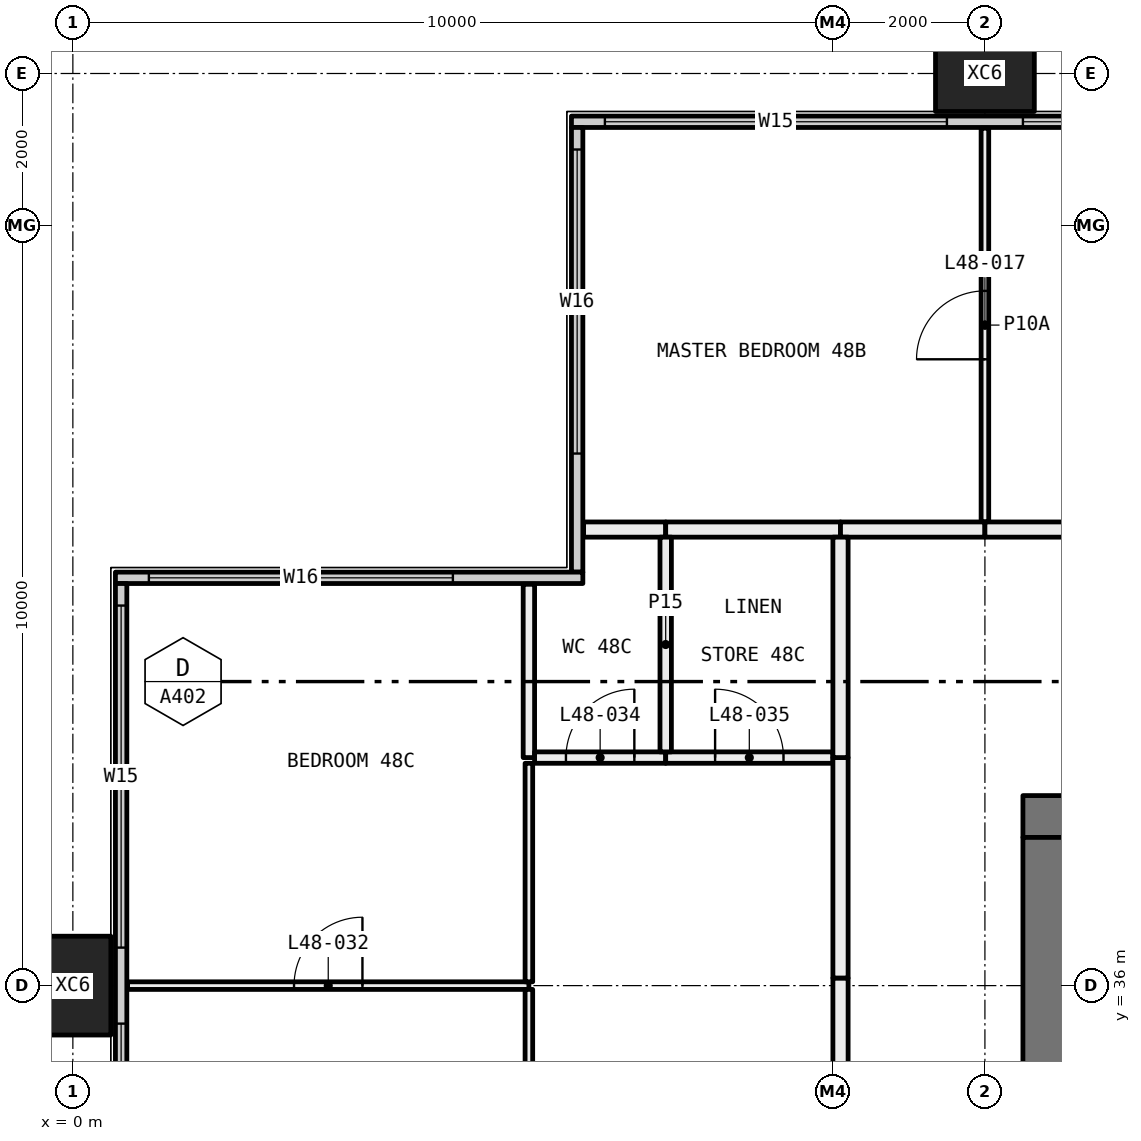
"""IFC4 building model, lengths in metres.
Left out: names, types, materials, properties, quantities, classifications, styles, units other than length and angle.
Written with IfcOpenShell. Run it as: python <this file> out.ifc"""

import sys

from ifc_helpers import new_model, si_unit, direction, frame, frame_2d, origin, origin_2d, place, context, subcontext, project, spatial, rectangle, hollow_rectangle, extrude, element, fill, save


model = new_model("IFC4")
c1 = context("Model", 3, precision=1e-05, world=origin(), true_north=direction((0.0, 1.0)))
c2 = subcontext(c1, "Body", "Model", "MODEL_VIEW")
j1 = project(units=[si_unit("LENGTHUNIT", "METRE"), si_unit("PLANEANGLEUNIT", "RADIAN")], contexts=[c1])
p1 = place(None, origin())
s1 = spatial("IfcSite", under=j1, at=p1, CompositionType="ELEMENT")
p2 = place(p1, origin())
s2 = spatial("IfcBuilding", under=s1, at=p2, CompositionType="ELEMENT")
p3 = place(p2, frame((0.0, 0.0, 182.4)))
s3 = spatial("IfcBuildingStorey", under=s2, at=p3, CompositionType="ELEMENT", Elevation=182.4)
for number, where, z_axis, x_axis in (
    (1, (0.0, 36.0, -0.4), (0.0, 0.0, 1.0), (0.0, 1.0, 0.0)),
    (2, (12.0, 48.0, -0.4), (0.0, 0.0, 1.0), (1.0, 0.0, 0.0)),
):
    element("IfcColumn", number, at=place(p3, frame(where, z_axis=z_axis, x_axis=x_axis)), inside=s3, PredefinedType="COLUMN", context=c2, shape_type="SweptSolid", body=[
        extrude(hollow_rectangle(XDim=1.3, YDim=1.0, WallThickness=0.05, at=origin_2d()), origin(), (0.0, 0.0, 1.0), 3.45),
    ])
p4 = place(p3, frame((6.56, 47.365, 0.0), z_axis=(0.0, 0.0, 1.0), x_axis=(1.0, 0.0, 0.0)))
e3 = element("IfcWall", 3, at=p4, inside=s3, PredefinedType="ELEMENTEDWALL", context=c2, shape_type="SweptSolid", body=[
    extrude(rectangle(XDim=46.88, YDim=0.15, at=frame_2d((23.44, 0.0))), origin(), (0.0, 0.0, 1.0), 3.05),
])
p5 = place(p4, frame((0.44, 0.0, 0.45)))
e4 = element("IfcOpeningElement", 4, at=p5, cuts=e3, PredefinedType="OPENING", context=c2, shape_type="SweptSolid", body=[
    extrude(rectangle(XDim=4.5, YDim=2.55, at=frame_2d((2.25, 1.275))), frame((0.0, 0.085, 0.0), z_axis=(0.0, -1.0, 0.0), x_axis=(1.0, 0.0, 0.0)), (0.0, 0.0, 1.0), 0.17),
])
p6 = place(p4, frame((5.94, 0.0, 0.45)))
e5 = element("IfcOpeningElement", 5, at=p6, cuts=e3, PredefinedType="OPENING", context=c2, shape_type="SweptSolid", body=[
    extrude(rectangle(XDim=3.75, YDim=2.55, at=frame_2d((1.875, 1.275))), frame((0.0, 0.085, 0.0), z_axis=(0.0, -1.0, 0.0), x_axis=(1.0, 0.0, 0.0)), (0.0, 0.0, 1.0), 0.17),
])
p7 = place(p4, frame((13.19, 0.0, 0.45)))
e6 = element("IfcOpeningElement", 6, at=p7, cuts=e3, PredefinedType="OPENING", context=c2, shape_type="SweptSolid", body=[
    extrude(rectangle(XDim=3.75, YDim=2.55, at=frame_2d((1.875, 1.275))), frame((0.0, 0.085, 0.0), z_axis=(0.0, -1.0, 0.0), x_axis=(1.0, 0.0, 0.0)), (0.0, 0.0, 1.0), 0.17),
])
p8 = place(p4, frame((17.94, 0.0, 0.45)))
e7 = element("IfcOpeningElement", 7, at=p8, cuts=e3, PredefinedType="OPENING", context=c2, shape_type="SweptSolid", body=[
    extrude(rectangle(XDim=3.75, YDim=2.55, at=frame_2d((1.875, 1.275))), frame((0.0, 0.085, 0.0), z_axis=(0.0, -1.0, 0.0), x_axis=(1.0, 0.0, 0.0)), (0.0, 0.0, 1.0), 0.17),
])
p9 = place(p4, frame((25.19, 0.0, 0.45)))
e8 = element("IfcOpeningElement", 8, at=p9, cuts=e3, PredefinedType="OPENING", context=c2, shape_type="SweptSolid", body=[
    extrude(rectangle(XDim=0.75, YDim=2.55, at=frame_2d((0.375, 1.275))), frame((0.0, 0.085, 0.0), z_axis=(0.0, -1.0, 0.0), x_axis=(1.0, 0.0, 0.0)), (0.0, 0.0, 1.0), 0.17),
])
p10 = place(p4, frame((26.94, 0.0, 0.45)))
e9 = element("IfcOpeningElement", 9, at=p10, cuts=e3, PredefinedType="OPENING", context=c2, shape_type="SweptSolid", body=[
    extrude(rectangle(XDim=2.0, YDim=2.55, at=frame_2d((1.0, 1.275))), frame((0.0, 0.085, 0.0), z_axis=(0.0, -1.0, 0.0), x_axis=(1.0, 0.0, 0.0)), (0.0, 0.0, 1.0), 0.17),
])
p11 = place(p4, frame((29.94, 0.0, 0.45)))
e10 = element("IfcOpeningElement", 10, at=p11, cuts=e3, PredefinedType="OPENING", context=c2, shape_type="SweptSolid", body=[
    extrude(rectangle(XDim=3.75, YDim=2.55, at=frame_2d((1.875, 1.275))), frame((0.0, 0.085, 0.0), z_axis=(0.0, -1.0, 0.0), x_axis=(1.0, 0.0, 0.0)), (0.0, 0.0, 1.0), 0.17),
])
p12 = place(p4, frame((37.19, 0.0, 0.45)))
e11 = element("IfcOpeningElement", 11, at=p12, cuts=e3, PredefinedType="OPENING", context=c2, shape_type="SweptSolid", body=[
    extrude(rectangle(XDim=3.75, YDim=2.55, at=frame_2d((1.875, 1.275))), frame((0.0, 0.085, 0.0), z_axis=(0.0, -1.0, 0.0), x_axis=(1.0, 0.0, 0.0)), (0.0, 0.0, 1.0), 0.17),
])
p13 = place(p4, frame((41.94, 0.0, 0.45)))
e12 = element("IfcOpeningElement", 12, at=p13, cuts=e3, PredefinedType="OPENING", context=c2, shape_type="SweptSolid", body=[
    extrude(rectangle(XDim=4.5, YDim=2.55, at=frame_2d((2.25, 1.275))), frame((0.0, 0.085, 0.0), z_axis=(0.0, -1.0, 0.0), x_axis=(1.0, 0.0, 0.0)), (0.0, 0.0, 1.0), 0.17),
])
p14 = place(p3, frame((6.635, 41.44, 0.0), z_axis=(0.0, 0.0, 1.0), x_axis=(0.0, 1.0, 0.0)))
e13 = element("IfcWall", 13, at=p14, inside=s3, PredefinedType="ELEMENTEDWALL", context=c2, shape_type="SweptSolid", body=[
    extrude(rectangle(XDim=5.85, YDim=0.15, at=frame_2d((2.925, 0.0))), origin(), (0.0, 0.0, 1.0), 3.05),
])
p15 = place(p14, frame((1.56, 0.0, 0.45)))
e14 = element("IfcOpeningElement", 14, at=p15, cuts=e13, PredefinedType="OPENING", context=c2, shape_type="SweptSolid", body=[
    extrude(rectangle(XDim=4.0, YDim=2.55, at=frame_2d((2.0, 1.275))), frame((0.0, 0.085, 0.0), z_axis=(0.0, -1.0, 0.0), x_axis=(1.0, 0.0, 0.0)), (0.0, 0.0, 1.0), 0.17),
])
p16 = place(p3, frame((0.56, 41.365, 0.0), z_axis=(0.0, 0.0, 1.0), x_axis=(1.0, 0.0, 0.0)))
e15 = element("IfcWall", 15, at=p16, inside=s3, PredefinedType="ELEMENTEDWALL", context=c2, shape_type="SweptSolid", body=[
    extrude(rectangle(XDim=6.15, YDim=0.15, at=frame_2d((3.075, 0.0))), origin(), (0.0, 0.0, 1.0), 3.05),
])
p17 = place(p16, frame((0.44, 0.0, 0.45)))
e16 = element("IfcOpeningElement", 16, at=p17, cuts=e15, PredefinedType="OPENING", context=c2, shape_type="SweptSolid", body=[
    extrude(rectangle(XDim=4.0, YDim=2.55, at=frame_2d((2.0, 1.275))), frame((0.0, 0.085, 0.0), z_axis=(0.0, -1.0, 0.0), x_axis=(1.0, 0.0, 0.0)), (0.0, 0.0, 1.0), 0.17),
])
p18 = place(p3, frame((0.635, 18.71, 0.0), z_axis=(0.0, 0.0, 1.0), x_axis=(0.0, 1.0, 0.0)))
e17 = element("IfcWall", 17, at=p18, inside=s3, PredefinedType="ELEMENTEDWALL", context=c2, shape_type="SweptSolid", body=[
    extrude(rectangle(XDim=22.58, YDim=0.15, at=frame_2d((11.29, 0.0))), origin(), (0.0, 0.0, 1.0), 3.05),
])
p19 = place(p18, frame((0.29, 0.0, 0.45)))
e18 = element("IfcOpeningElement", 18, at=p19, cuts=e17, PredefinedType="OPENING", context=c2, shape_type="SweptSolid", body=[
    extrude(rectangle(XDim=4.5, YDim=2.55, at=frame_2d((2.25, 1.275))), frame((0.0, 0.085, 0.0), z_axis=(0.0, -1.0, 0.0), x_axis=(1.0, 0.0, 0.0)), (0.0, 0.0, 1.0), 0.17),
])
p20 = place(p18, frame((5.79, 0.0, 0.45)))
e19 = element("IfcOpeningElement", 19, at=p20, cuts=e17, PredefinedType="OPENING", context=c2, shape_type="SweptSolid", body=[
    extrude(rectangle(XDim=3.75, YDim=2.55, at=frame_2d((1.875, 1.275))), frame((0.0, 0.085, 0.0), z_axis=(0.0, -1.0, 0.0), x_axis=(1.0, 0.0, 0.0)), (0.0, 0.0, 1.0), 0.17),
])
p21 = place(p18, frame((13.04, 0.0, 0.45)))
e20 = element("IfcOpeningElement", 20, at=p21, cuts=e17, PredefinedType="OPENING", context=c2, shape_type="SweptSolid", body=[
    extrude(rectangle(XDim=0.75, YDim=2.55, at=frame_2d((0.375, 1.275))), frame((0.0, 0.085, 0.0), z_axis=(0.0, -1.0, 0.0), x_axis=(1.0, 0.0, 0.0)), (0.0, 0.0, 1.0), 0.17),
])
p22 = place(p18, frame((14.79, 0.0, 0.45)))
e21 = element("IfcOpeningElement", 21, at=p22, cuts=e17, PredefinedType="OPENING", context=c2, shape_type="SweptSolid", body=[
    extrude(rectangle(XDim=2.0, YDim=2.55, at=frame_2d((1.0, 1.275))), frame((0.0, 0.085, 0.0), z_axis=(0.0, -1.0, 0.0), x_axis=(1.0, 0.0, 0.0)), (0.0, 0.0, 1.0), 0.17),
])
p23 = place(p18, frame((17.79, 0.0, 0.45)))
e22 = element("IfcOpeningElement", 22, at=p23, cuts=e17, PredefinedType="OPENING", context=c2, shape_type="SweptSolid", body=[
    extrude(rectangle(XDim=4.5, YDim=2.55, at=frame_2d((2.25, 1.275))), frame((0.0, 0.085, 0.0), z_axis=(0.0, -1.0, 0.0), x_axis=(1.0, 0.0, 0.0)), (0.0, 0.0, 1.0), 0.17),
])
p24 = place(p3, frame((12.0, 42.1, 0.0), z_axis=(0.0, 0.0, 1.0), x_axis=(0.0, 1.0, 0.0)))
e23 = element("IfcWall", 23, at=p24, inside=s3, PredefinedType="PARTITIONING", context=c2, shape_type="SweptSolid", body=[
    extrude(rectangle(XDim=5.18, YDim=0.1, at=frame_2d((2.59, 0.0))), origin(), (0.0, 0.0, 1.0), 3.05),
])
p25 = place(p24, frame((2.14, 0.0, 0.0)))
e24 = element("IfcOpeningElement", 24, at=p25, cuts=e23, PredefinedType="OPENING", context=c2, shape_type="SweptSolid", body=[
    extrude(rectangle(XDim=0.9, YDim=2.1, at=frame_2d((0.45, 1.05))), frame((0.0, 0.06, 0.0), z_axis=(0.0, -1.0, 0.0), x_axis=(1.0, 0.0, 0.0)), (0.0, 0.0, 1.0), 0.12),
])
p26 = place(p3, frame((6.72, 42.0, 0.0), z_axis=(0.0, 0.0, 1.0), x_axis=(1.0, 0.0, 0.0)))
e25 = element("IfcWall", 25, at=p26, inside=s3, PredefinedType="PARTITIONING", context=c2, shape_type="SweptSolid", body=[
    extrude(rectangle(XDim=1.08, YDim=0.2, at=frame_2d((0.54, 0.0))), origin(), (0.0, 0.0, 1.0), 3.05),
])
p27 = place(p3, frame((7.8, 42.0, 0.0), z_axis=(0.0, 0.0, 1.0), x_axis=(1.0, 0.0, 0.0)))
e26 = element("IfcWall", 26, at=p27, inside=s3, PredefinedType="PARTITIONING", context=c2, shape_type="SweptSolid", body=[
    extrude(rectangle(XDim=2.3, YDim=0.2, at=frame_2d((1.15, 0.0))), origin(), (0.0, 0.0, 1.0), 3.05),
])
p28 = place(p3, frame((10.1, 42.0, 0.0), z_axis=(0.0, 0.0, 1.0), x_axis=(1.0, 0.0, 0.0)))
e27 = element("IfcWall", 27, at=p28, inside=s3, PredefinedType="PARTITIONING", context=c2, shape_type="SweptSolid", body=[
    extrude(rectangle(XDim=1.9, YDim=0.2, at=frame_2d((0.95, 0.0))), origin(), (0.0, 0.0, 1.0), 3.05),
])
p29 = place(p3, frame((12.0, 42.0, 0.0), z_axis=(0.0, 0.0, 1.0), x_axis=(1.0, 0.0, 0.0)))
e28 = element("IfcWall", 28, at=p29, inside=s3, PredefinedType="PARTITIONING", context=c2, shape_type="SweptSolid", body=[
    extrude(rectangle(XDim=6.0, YDim=0.2, at=frame_2d((3.0, 0.0))), origin(), (0.0, 0.0, 1.0), 3.05),
])
p30 = place(p29, frame((2.5, 0.0, 0.0)))
e29 = element("IfcOpeningElement", 29, at=p30, cuts=e28, PredefinedType="OPENING", context=c2, shape_type="SweptSolid", body=[
    extrude(rectangle(XDim=1.0, YDim=2.1, at=frame_2d((0.5, 1.05))), frame((0.0, 0.11, 0.0), z_axis=(0.0, -1.0, 0.0), x_axis=(1.0, 0.0, 0.0)), (0.0, 0.0, 1.0), 0.22),
])
p31 = place(p3, frame((6.0, 36.0, 0.0), z_axis=(0.0, 0.0, 1.0), x_axis=(-1.0, 0.0, 0.0)))
e30 = element("IfcWall", 30, at=p31, inside=s3, PredefinedType="PARTITIONING", context=c2, shape_type="SweptSolid", body=[
    extrude(rectangle(XDim=5.28, YDim=0.1, at=frame_2d((2.64, 0.0))), origin(), (0.0, 0.0, 1.0), 2.45),
])
p32 = place(p31, frame((2.19, 0.0, 0.0)))
e31 = element("IfcOpeningElement", 31, at=p32, cuts=e30, PredefinedType="OPENING", context=c2, shape_type="SweptSolid", body=[
    extrude(rectangle(XDim=0.9, YDim=2.1, at=frame_2d((0.45, 1.05))), frame((0.0, 0.06, 0.0), z_axis=(0.0, -1.0, 0.0), x_axis=(1.0, 0.0, 0.0)), (0.0, 0.0, 1.0), 0.12),
])
p33 = place(p3, frame((6.0, 25.5, 0.0), z_axis=(0.0, 0.0, 1.0), x_axis=(0.0, 1.0, 0.0)))
e32 = element("IfcWall", 32, at=p33, inside=s3, PredefinedType="PARTITIONING", context=c2, shape_type="SweptSolid", body=[
    extrude(rectangle(XDim=10.45, YDim=0.1, at=frame_2d((5.225, 0.0))), origin(), (0.0, 0.0, 1.0), 2.45),
])
p34 = place(p3, frame((6.0, 36.05, 0.0), z_axis=(0.0, 0.0, 1.0), x_axis=(0.0, 1.0, 0.0)))
e33 = element("IfcWall", 33, at=p34, inside=s3, PredefinedType="PARTITIONING", context=c2, shape_type="SweptSolid", body=[
    extrude(rectangle(XDim=2.875, YDim=0.1, at=frame_2d((1.438, 0.0))), origin(), (0.0, 0.0, 1.0), 2.45),
])
p35 = place(p3, frame((6.0, 39.0, 0.0), z_axis=(0.0, 0.0, 1.0), x_axis=(0.0, 1.0, 0.0)))
e34 = element("IfcWall", 34, at=p35, inside=s3, PredefinedType="PARTITIONING", context=c2, shape_type="SweptSolid", body=[
    extrude(rectangle(XDim=2.28, YDim=0.15, at=frame_2d((1.14, 0.0))), origin(), (0.0, 0.0, 1.0), 3.05),
])
p36 = place(p3, frame((7.8, 39.0, 0.0), z_axis=(0.0, 0.0, 1.0), x_axis=(-1.0, 0.0, 0.0)))
e35 = element("IfcWall", 35, at=p36, inside=s3, PredefinedType="PARTITIONING", context=c2, shape_type="SweptSolid", body=[
    extrude(rectangle(XDim=1.725, YDim=0.15, at=frame_2d((0.863, 0.0))), origin(), (0.0, 0.0, 1.0), 3.05),
])
p37 = place(p36, frame((0.413, 0.0, 0.0)))
e36 = element("IfcOpeningElement", 36, at=p37, cuts=e35, PredefinedType="OPENING", context=c2, shape_type="SweptSolid", body=[
    extrude(rectangle(XDim=0.9, YDim=2.1, at=frame_2d((0.45, 1.05))), frame((0.0, 0.085, 0.0), z_axis=(0.0, -1.0, 0.0), x_axis=(1.0, 0.0, 0.0)), (0.0, 0.0, 1.0), 0.17),
])
p38 = place(p3, frame((10.0, 39.0, 0.0), z_axis=(0.0, 0.0, 1.0), x_axis=(-1.0, 0.0, 0.0)))
e37 = element("IfcWall", 37, at=p38, inside=s3, PredefinedType="PARTITIONING", context=c2, shape_type="SweptSolid", body=[
    extrude(rectangle(XDim=2.2, YDim=0.15, at=frame_2d((1.1, 0.0))), origin(), (0.0, 0.0, 1.0), 3.05),
])
p39 = place(p38, frame((0.65, 0.0, 0.0)))
e38 = element("IfcOpeningElement", 38, at=p39, cuts=e37, PredefinedType="OPENING", context=c2, shape_type="SweptSolid", body=[
    extrude(rectangle(XDim=0.9, YDim=2.1, at=frame_2d((0.45, 1.05))), frame((0.0, 0.085, 0.0), z_axis=(0.0, -1.0, 0.0), x_axis=(1.0, 0.0, 0.0)), (0.0, 0.0, 1.0), 0.17),
])
p40 = place(p3, frame((10.1, 25.5, 0.0), z_axis=(0.0, 0.0, 1.0), x_axis=(0.0, 1.0, 0.0)))
e39 = element("IfcWall", 39, at=p40, inside=s3, PredefinedType="PARTITIONING", context=c2, shape_type="SweptSolid", body=[
    extrude(rectangle(XDim=10.6, YDim=0.2, at=frame_2d((5.3, 0.0))), origin(), (0.0, 0.0, 1.0), 2.45),
])
p41 = place(p3, frame((10.1, 36.1, 0.0), z_axis=(0.0, 0.0, 1.0), x_axis=(0.0, 1.0, 0.0)))
e40 = element("IfcWall", 40, at=p41, inside=s3, PredefinedType="PARTITIONING", context=c2, shape_type="SweptSolid", body=[
    extrude(rectangle(XDim=2.9, YDim=0.2, at=frame_2d((1.45, 0.0))), origin(), (0.0, 0.0, 1.0), 3.05),
])
p42 = place(p3, frame((7.8, 39.075, 0.0), z_axis=(0.0, 0.0, 1.0), x_axis=(0.0, 1.0, 0.0)))
e41 = element("IfcWall", 41, at=p42, inside=s3, PredefinedType="PARTITIONING", context=c2, shape_type="SweptSolid", body=[
    extrude(rectangle(XDim=2.825, YDim=0.15, at=frame_2d((1.413, 0.0))), origin(), (0.0, 0.0, 1.0), 3.05),
])
p43 = place(p3, frame((10.1, 39.0, 0.0), z_axis=(0.0, 0.0, 1.0), x_axis=(0.0, 1.0, 0.0)))
e42 = element("IfcWall", 42, at=p43, inside=s3, PredefinedType="PARTITIONING", context=c2, shape_type="SweptSolid", body=[
    extrude(rectangle(XDim=2.9, YDim=0.2, at=frame_2d((1.45, 0.0))), origin(), (0.0, 0.0, 1.0), 3.05),
])
p44 = place(p3, frame((12.5, 38.225, 0.0), z_axis=(0.0, 0.0, 1.0), x_axis=(1.0, 0.0, 0.0)))
e43 = element("IfcWall", 43, at=p44, inside=s3, PredefinedType="SHEAR", context=c2, shape_type="SweptSolid", body=[
    extrude(rectangle(XDim=11.0, YDim=0.55, at=frame_2d((5.5, 0.0))), origin(), (0.0, 0.0, 1.0), 3.05),
])
p45 = place(p44, frame((8.525, 0.0, 0.0)))
e44 = element("IfcOpeningElement", 44, at=p45, cuts=e43, PredefinedType="OPENING", context=c2, shape_type="SweptSolid", body=[
    extrude(rectangle(XDim=1.6, YDim=2.1, at=frame_2d((0.8, 1.05))), frame((0.0, 0.285, 0.0), z_axis=(0.0, -1.0, 0.0), x_axis=(1.0, 0.0, 0.0)), (0.0, 0.0, 1.0), 0.57),
])
p46 = place(p3, frame((12.775, 22.05, 0.0), z_axis=(0.0, 0.0, 1.0), x_axis=(0.0, 1.0, 0.0)))
e45 = element("IfcWall", 45, at=p46, inside=s3, PredefinedType="SHEAR", context=c2, shape_type="SweptSolid", body=[
    extrude(rectangle(XDim=15.9, YDim=0.55, at=frame_2d((7.95, 0.0))), origin(), (0.0, 0.0, 1.0), 3.05),
])
p47 = place(p46, frame((8.4, 0.0, 0.0)))
e46 = element("IfcOpeningElement", 46, at=p47, cuts=e45, PredefinedType="OPENING", context=c2, shape_type="SweptSolid", body=[
    extrude(rectangle(XDim=1.6, YDim=2.1, at=frame_2d((0.8, 1.05))), frame((0.0, 0.285, 0.0), z_axis=(0.0, -1.0, 0.0), x_axis=(1.0, 0.0, 0.0)), (0.0, 0.0, 1.0), 0.57),
])
p48 = place(p46, frame((2.175, 0.0, 0.0)))
e47 = element("IfcOpeningElement", 47, at=p48, cuts=e45, PredefinedType="OPENING", context=c2, shape_type="SweptSolid", body=[
    extrude(rectangle(XDim=1.0, YDim=2.1, at=frame_2d((0.5, 1.05))), frame((0.0, 0.285, 0.0), z_axis=(0.0, -1.0, 0.0), x_axis=(1.0, 0.0, 0.0)), (0.0, 0.0, 1.0), 0.57),
])
p49 = place(p5, origin())
e48 = element("IfcWindow", 48, at=p49, inside=s3, PartitioningType="SINGLE_PANEL", PredefinedType="WINDOW", context=c2, shape_type="SweptSolid", body=[
    extrude(rectangle(XDim=4.5, YDim=2.55, at=frame_2d((2.25, 1.275))), frame((0.0, 0.03, 0.0), z_axis=(0.0, -1.0, 0.0), x_axis=(1.0, 0.0, 0.0)), (0.0, 0.0, 1.0), 0.06),
])
fill(e4, e48)
p50 = place(p6, origin())
e49 = element("IfcWindow", 49, at=p50, inside=s3, PartitioningType="SINGLE_PANEL", PredefinedType="WINDOW", context=c2, shape_type="SweptSolid", body=[
    extrude(rectangle(XDim=3.75, YDim=2.55, at=frame_2d((1.875, 1.275))), frame((0.0, 0.03, 0.0), z_axis=(0.0, -1.0, 0.0), x_axis=(1.0, 0.0, 0.0)), (0.0, 0.0, 1.0), 0.06),
])
fill(e5, e49)
p51 = place(p15, origin())
e50 = element("IfcWindow", 50, at=p51, inside=s3, PartitioningType="SINGLE_PANEL", PredefinedType="WINDOW", context=c2, shape_type="SweptSolid", body=[
    extrude(rectangle(XDim=4.0, YDim=2.55, at=frame_2d((2.0, 1.275))), frame((0.0, 0.03, 0.0), z_axis=(0.0, -1.0, 0.0), x_axis=(1.0, 0.0, 0.0)), (0.0, 0.0, 1.0), 0.06),
])
fill(e14, e50)
p52 = place(p17, origin())
e51 = element("IfcWindow", 51, at=p52, inside=s3, PartitioningType="SINGLE_PANEL", PredefinedType="WINDOW", context=c2, shape_type="SweptSolid", body=[
    extrude(rectangle(XDim=4.0, YDim=2.55, at=frame_2d((2.0, 1.275))), frame((0.0, 0.03, 0.0), z_axis=(0.0, -1.0, 0.0), x_axis=(1.0, 0.0, 0.0)), (0.0, 0.0, 1.0), 0.06),
])
fill(e16, e51)
p53 = place(p22, origin())
e52 = element("IfcWindow", 52, at=p53, inside=s3, PartitioningType="SINGLE_PANEL", PredefinedType="WINDOW", context=c2, shape_type="SweptSolid", body=[
    extrude(rectangle(XDim=2.0, YDim=2.55, at=frame_2d((1.0, 1.275))), frame((0.0, 0.03, 0.0), z_axis=(0.0, -1.0, 0.0), x_axis=(1.0, 0.0, 0.0)), (0.0, 0.0, 1.0), 0.06),
])
fill(e21, e52)
p54 = place(p23, origin())
e53 = element("IfcWindow", 53, at=p54, inside=s3, PartitioningType="SINGLE_PANEL", PredefinedType="WINDOW", context=c2, shape_type="SweptSolid", body=[
    extrude(rectangle(XDim=4.5, YDim=2.55, at=frame_2d((2.25, 1.275))), frame((0.0, 0.03, 0.0), z_axis=(0.0, -1.0, 0.0), x_axis=(1.0, 0.0, 0.0)), (0.0, 0.0, 1.0), 0.06),
])
fill(e22, e53)
p55 = place(p25, origin())
e54 = element("IfcDoor", 54, at=p55, inside=s3, OperationType="SINGLE_SWING_RIGHT", PredefinedType="DOOR", context=c2, shape_type="SweptSolid", body=[
    extrude(rectangle(XDim=0.9, YDim=2.1, at=frame_2d((0.45, 1.05))), frame((0.0, 0.025, 0.0), z_axis=(0.0, -1.0, 0.0), x_axis=(1.0, 0.0, 0.0)), (0.0, 0.0, 1.0), 0.05),
])
fill(e24, e54)
p56 = place(p32, frame((0.9, 0.0, 0.0), x_axis=(-1.0, 0.0, 0.0)))
e55 = element("IfcDoor", 55, at=p56, inside=s3, OperationType="SINGLE_SWING_LEFT", PredefinedType="DOOR", context=c2, shape_type="SweptSolid", body=[
    extrude(rectangle(XDim=0.9, YDim=2.1, at=frame_2d((0.45, 1.05))), frame((0.0, 0.025, 0.0), z_axis=(0.0, -1.0, 0.0), x_axis=(1.0, 0.0, 0.0)), (0.0, 0.0, 1.0), 0.05),
])
fill(e31, e55)
p57 = place(p37, frame((0.9, 0.0, 0.0), x_axis=(-1.0, 0.0, 0.0)))
e56 = element("IfcDoor", 56, at=p57, inside=s3, OperationType="SINGLE_SWING_LEFT", PredefinedType="DOOR", context=c2, shape_type="SweptSolid", body=[
    extrude(rectangle(XDim=0.9, YDim=2.1, at=frame_2d((0.45, 1.05))), frame((0.0, 0.025, 0.0), z_axis=(0.0, -1.0, 0.0), x_axis=(1.0, 0.0, 0.0)), (0.0, 0.0, 1.0), 0.05),
])
fill(e36, e56)
p58 = place(p39, frame((0.9, 0.0, 0.0), x_axis=(-1.0, 0.0, 0.0)))
e57 = element("IfcDoor", 57, at=p58, inside=s3, OperationType="SINGLE_SWING_RIGHT", PredefinedType="DOOR", context=c2, shape_type="SweptSolid", body=[
    extrude(rectangle(XDim=0.9, YDim=2.1, at=frame_2d((0.45, 1.05))), frame((0.0, 0.025, 0.0), z_axis=(0.0, -1.0, 0.0), x_axis=(1.0, 0.0, 0.0)), (0.0, 0.0, 1.0), 0.05),
])
fill(e38, e57)
save(model, sys.argv[1])
